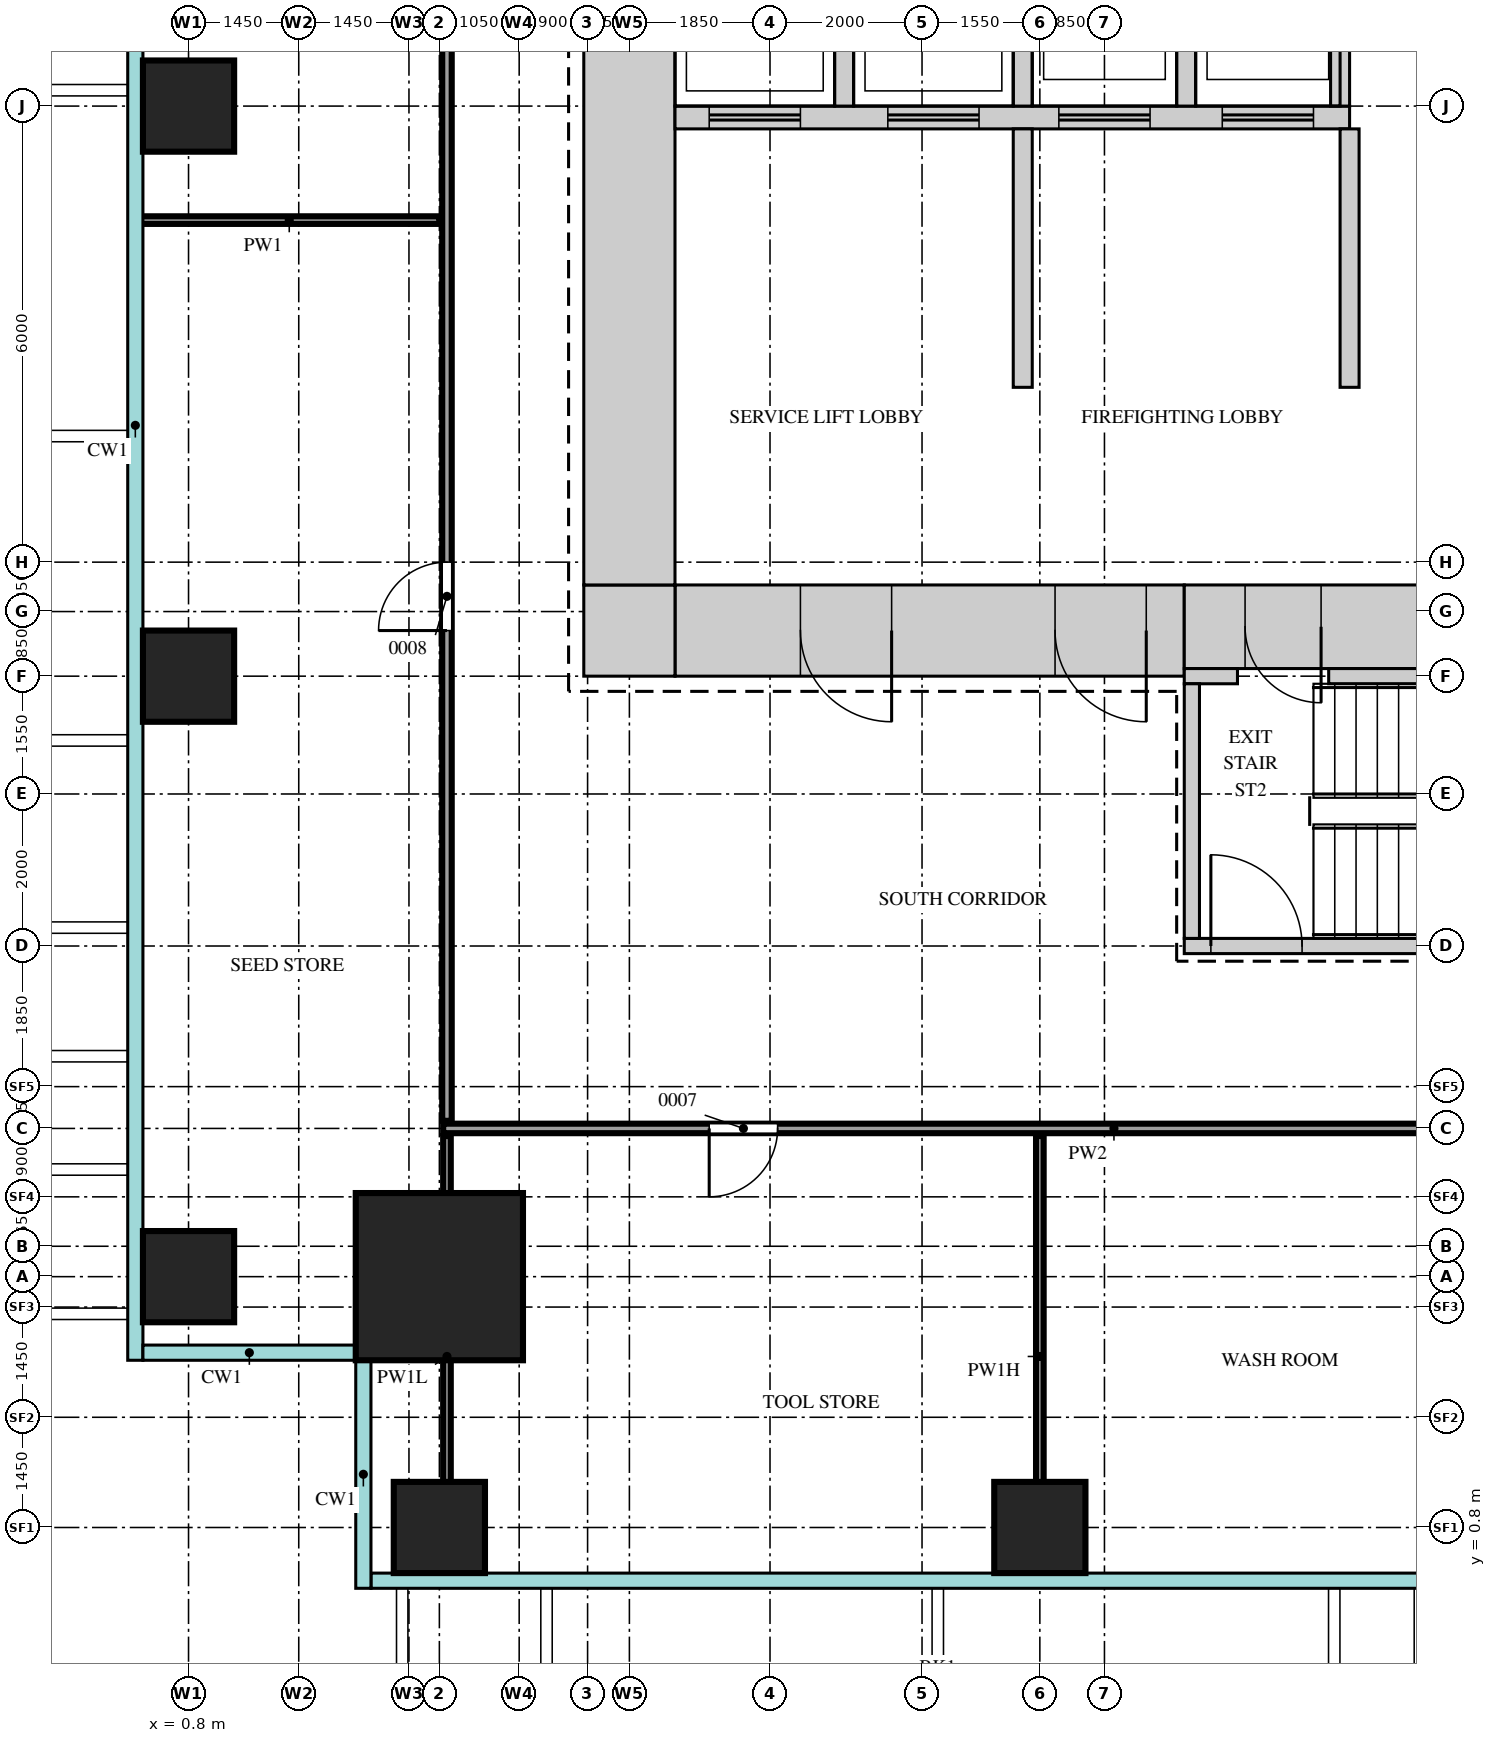
"""IFC4 building model, lengths in metres.
Left out: names, types, materials, properties, quantities, classifications, styles, units other than length and angle.
Written with IfcOpenShell. Run it as: python <this file> out.ifc"""

import sys

from ifc_helpers import new_model, si_unit, direction, frame, frame_2d, origin, origin_2d, place, context, subcontext, project, spatial, rectangle, extrude, source, transform, mapped, element, fill, save


model = new_model("IFC4")
c1 = context("Model", 3, precision=1e-05, world=origin(), true_north=direction((0.0, 1.0)))
c2 = subcontext(c1, "Body", "Model", "MODEL_VIEW")
j1 = project(units=[si_unit("LENGTHUNIT", "METRE"), si_unit("PLANEANGLEUNIT", "RADIAN")], contexts=[c1])
p1 = place(None, origin())
s1 = spatial("IfcSite", under=j1, at=p1, CompositionType="ELEMENT")
p2 = place(p1, origin())
s2 = spatial("IfcBuilding", under=s1, at=p2, CompositionType="ELEMENT")
p3 = place(p2, frame((0.0, 0.0, 60.0)))
s3 = spatial("IfcBuildingStorey", under=s2, at=p3, CompositionType="ELEMENT", Elevation=60.0)
m1 = source(origin(), c2, "Body", "SweptSolid", [
    extrude(rectangle(XDim=6.7, YDim=1.2, at=frame_2d((3.35, 0.0))), origin(), (0.0, 0.0, 1.0), 4.2),
])
p4 = place(p3, frame((7.2, 12.6, 0.0), z_axis=(0.0, 0.0, 1.0), x_axis=(1.0, 0.0, 0.0)))
e1 = element("IfcWall", 1, at=p4, inside=s3, PredefinedType="SHEAR", context=c2, shape_type="MappedRepresentation", body=[
    mapped(m1, transform((0.0, 0.0, 0.0))),
])
m2 = source(origin(), c2, "Body", "SweptSolid", [
    extrude(rectangle(XDim=1.2, YDim=2.1, at=frame_2d((0.6, 1.05))), frame((0.0, 0.61, 0.0), z_axis=(0.0, -1.0, 0.0), x_axis=(1.0, 0.0, 0.0)), (0.0, 0.0, 1.0), 1.22),
])
p5 = place(p4, frame((5.0, 0.0, 0.0)))
e2 = element("IfcOpeningElement", 2, at=p5, cuts=e1, PredefinedType="OPENING", context=c2, shape_type="MappedRepresentation", body=[
    mapped(m2, transform((0.0, 0.0, 0.0))),
])
p6 = place(p4, frame((1.65, 0.0, 0.0)))
e3 = element("IfcOpeningElement", 3, at=p6, cuts=e1, PredefinedType="OPENING", context=c2, shape_type="MappedRepresentation", body=[
    mapped(m2, transform((0.0, 0.0, 0.0))),
])
m3 = source(origin(), c2, "Body", "SweptSolid", [
    extrude(rectangle(XDim=7.2, YDim=1.1, at=frame_2d((3.6, 0.0))), origin(), (0.0, 0.0, 1.0), 4.2),
])
p7 = place(p3, frame((13.9, 12.65, 0.0), z_axis=(0.0, 0.0, 1.0), x_axis=(1.0, 0.0, 0.0)))
e4 = element("IfcWall", 4, at=p7, inside=s3, PredefinedType="SHEAR", context=c2, shape_type="MappedRepresentation", body=[
    mapped(m3, transform((0.0, 0.0, 0.0))),
])
m4 = source(origin(), c2, "Body", "SweptSolid", [
    extrude(rectangle(XDim=1.0, YDim=2.1, at=frame_2d((0.5, 1.05))), frame((0.0, 0.56, 0.0), z_axis=(0.0, -1.0, 0.0), x_axis=(1.0, 0.0, 0.0)), (0.0, 0.0, 1.0), 1.12),
])
p8 = place(p7, frame((0.8, 0.0, 0.0)))
e5 = element("IfcOpeningElement", 5, at=p8, cuts=e4, PredefinedType="OPENING", context=c2, shape_type="MappedRepresentation", body=[
    mapped(m4, transform((0.0, 0.0, 0.0))),
])
m5 = source(origin(), c2, "Body", "SweptSolid", [
    extrude(rectangle(XDim=1.2, YDim=1.2, at=frame_2d((0.6, 0.0))), origin(), (0.0, 0.0, 1.0), 4.2),
])
p9 = place(p3, frame((6.0, 12.6, 0.0), z_axis=(0.0, 0.0, 1.0), x_axis=(1.0, 0.0, 0.0)))
e6 = element("IfcWall", 6, at=p9, inside=s3, PredefinedType="SHEAR", context=c2, shape_type="MappedRepresentation", body=[
    mapped(m5, transform((0.0, 0.0, 0.0))),
])
m6 = source(origin(), c2, "Body", "SweptSolid", [
    extrude(rectangle(XDim=27.6, YDim=1.2, at=frame_2d((13.8, 0.0))), origin(), (0.0, 0.0, 1.0), 4.2),
])
p10 = place(p3, frame((6.6, 13.2, 0.0), z_axis=(0.0, 0.0, 1.0), x_axis=(0.0, 1.0, 0.0)))
e7 = element("IfcWall", 7, at=p10, inside=s3, PredefinedType="SHEAR", context=c2, shape_type="MappedRepresentation", body=[
    mapped(m6, transform((0.0, 0.0, 0.0))),
])
m7 = source(origin(), c2, "Body", "SweptSolid", [
    extrude(rectangle(XDim=0.7, YDim=0.2, at=frame_2d((0.35, 0.0))), origin(), (0.0, 0.0, 1.0), 4.2),
])
p11 = place(p3, frame((13.9, 12.0, 0.0), z_axis=(0.0, 0.0, 1.0), x_axis=(1.0, 0.0, 0.0)))
e8 = element("IfcWall", 8, at=p11, inside=s3, PredefinedType="SHEAR", context=c2, shape_type="MappedRepresentation", body=[
    mapped(m7, transform((0.0, 0.0, 0.0))),
])
m8 = source(origin(), c2, "Body", "SweptSolid", [
    extrude(rectangle(XDim=5.3, YDim=0.2, at=frame_2d((2.65, 0.0))), origin(), (0.0, 0.0, 1.0), 4.2),
])
p12 = place(p3, frame((15.8, 12.0, 0.0), z_axis=(0.0, 0.0, 1.0), x_axis=(1.0, 0.0, 0.0)))
e9 = element("IfcWall", 9, at=p12, inside=s3, PredefinedType="SHEAR", context=c2, shape_type="MappedRepresentation", body=[
    mapped(m8, transform((0.0, 0.0, 0.0))),
])
m9 = source(origin(), c2, "Body", "SweptSolid", [
    extrude(rectangle(XDim=7.2, YDim=0.2, at=frame_2d((3.6, 0.0))), origin(), (0.0, 0.0, 1.0), 4.2),
])
p13 = place(p3, frame((13.9, 8.45, 0.0), z_axis=(0.0, 0.0, 1.0), x_axis=(1.0, 0.0, 0.0)))
e10 = element("IfcWall", 10, at=p13, inside=s3, PredefinedType="SHEAR", context=c2, shape_type="MappedRepresentation", body=[
    mapped(m9, transform((0.0, 0.0, 0.0))),
])
m10 = source(origin(), c2, "Body", "SweptSolid", [
    extrude(rectangle(XDim=1.2, YDim=2.1, at=frame_2d((0.6, 1.05))), frame((0.0, 0.11, 0.0), z_axis=(0.0, -1.0, 0.0), x_axis=(1.0, 0.0, 0.0)), (0.0, 0.0, 1.0), 0.22),
])
p14 = place(p13, frame((0.35, 0.0, 0.0)))
e11 = element("IfcOpeningElement", 11, at=p14, cuts=e10, PredefinedType="OPENING", context=c2, shape_type="MappedRepresentation", body=[
    mapped(m10, transform((0.0, 0.0, 0.0))),
])
m11 = source(origin(), c2, "Body", "SweptSolid", [
    extrude(rectangle(XDim=3.35, YDim=0.2, at=frame_2d((1.675, 0.0))), origin(), (0.0, 0.0, 1.0), 4.2),
])
p15 = place(p3, frame((14.0, 8.55, 0.0), z_axis=(0.0, 0.0, 1.0), x_axis=(0.0, 1.0, 0.0)))
e12 = element("IfcWall", 12, at=p15, inside=s3, PredefinedType="SHEAR", context=c2, shape_type="MappedRepresentation", body=[
    mapped(m11, transform((0.0, 0.0, 0.0))),
])
m12 = source(origin(), c2, "Body", "SweptSolid", [
    extrude(rectangle(XDim=8.875, YDim=0.3, at=frame_2d((4.438, 0.0))), origin(), (0.0, 0.0, 1.0), 4.2),
])
p16 = place(p3, frame((7.2, 19.35, 0.0), z_axis=(0.0, 0.0, 1.0), x_axis=(1.0, 0.0, 0.0)))
e13 = element("IfcWall", 13, at=p16, inside=s3, PredefinedType="STANDARD", context=c2, shape_type="MappedRepresentation", body=[
    mapped(m12, transform((0.0, 0.0, 0.0))),
])
m13 = source(origin(), c2, "Body", "SweptSolid", [
    extrude(rectangle(XDim=1.2, YDim=2.1, at=frame_2d((0.6, 1.05))), frame((0.0, 0.16, 0.0), z_axis=(0.0, -1.0, 0.0), x_axis=(1.0, 0.0, 0.0)), (0.0, 0.0, 1.0), 0.32),
])
p17 = place(p16, frame((0.45, 0.0, 0.0)))
e14 = element("IfcOpeningElement", 14, at=p17, cuts=e13, PredefinedType="OPENING", context=c2, shape_type="MappedRepresentation", body=[
    mapped(m13, transform((0.0, 0.0, 0.0))),
])
p18 = place(p16, frame((2.8, 0.0, 0.0)))
e15 = element("IfcOpeningElement", 15, at=p18, cuts=e13, PredefinedType="OPENING", context=c2, shape_type="MappedRepresentation", body=[
    mapped(m13, transform((0.0, 0.0, 0.0))),
])
p19 = place(p16, frame((5.05, 0.0, 0.0)))
e16 = element("IfcOpeningElement", 16, at=p19, cuts=e13, PredefinedType="OPENING", context=c2, shape_type="MappedRepresentation", body=[
    mapped(m13, transform((0.0, 0.0, 0.0))),
])
p20 = place(p16, frame((7.2, 0.0, 0.0)))
e17 = element("IfcOpeningElement", 17, at=p20, cuts=e13, PredefinedType="OPENING", context=c2, shape_type="MappedRepresentation", body=[
    mapped(m13, transform((0.0, 0.0, 0.0))),
])
m14 = source(origin(), c2, "Body", "SweptSolid", [
    extrude(rectangle(XDim=3.1, YDim=0.25, at=frame_2d((1.55, 0.0))), origin(), (0.0, 0.0, 1.0), 4.2),
])
for number, where, z_axis, x_axis in (
    (18, (9.425, 19.5, 0.0), (0.0, 0.0, 1.0), (0.0, 1.0, 0.0)),
    (19, (11.775, 19.5, 0.0), (0.0, 0.0, 1.0), (0.0, 1.0, 0.0)),
    (20, (13.925, 19.5, 0.0), (0.0, 0.0, 1.0), (0.0, 1.0, 0.0)),
    (21, (15.95, 19.5, 0.0), (0.0, 0.0, 1.0), (0.0, 1.0, 0.0)),
):
    element("IfcWall", number, at=place(p3, frame(where, z_axis=z_axis, x_axis=x_axis)), inside=s3, PredefinedType="STANDARD", context=c2, shape_type="MappedRepresentation", body=[
        mapped(m14, transform((0.0, 0.0, 0.0))),
    ])
m15 = source(origin(), c2, "Body", "SweptSolid", [
    extrude(rectangle(XDim=3.4, YDim=0.25, at=frame_2d((1.7, 0.0))), origin(), (0.0, 0.0, 1.0), 4.2),
])
for number, where, z_axis, x_axis in (
    (22, (16.075, 15.8, 0.0), (0.0, 0.0, 1.0), (0.0, 1.0, 0.0)),
    (23, (11.775, 15.8, 0.0), (0.0, 0.0, 1.0), (0.0, 1.0, 0.0)),
):
    element("IfcWall", number, at=place(p3, frame(where, z_axis=z_axis, x_axis=x_axis)), inside=s3, PredefinedType="STANDARD", context=c2, shape_type="MappedRepresentation", body=[
        mapped(m15, transform((0.0, 0.0, 0.0))),
    ])
m16 = source(origin(), c2, "Body", "SweptSolid", [
    extrude(rectangle(XDim=2.2, YDim=2.2, at=origin_2d()), origin(), (0.0, 0.0, 1.0), 4.5),
])
p21 = place(p3, frame((4.1, 4.1, 0.0), z_axis=(0.0, 0.0, 1.0), x_axis=(1.0, 0.0, 0.0)))
e24 = element("IfcColumn", 24, at=p21, inside=s3, PredefinedType="COLUMN", context=c2, shape_type="MappedRepresentation", body=[
    mapped(m16, transform((0.0, 0.0, 0.0))),
])
m17 = source(origin(), c2, "Body", "SweptSolid", [
    extrude(rectangle(XDim=1.2, YDim=1.2, at=origin_2d()), origin(), (0.0, 0.0, 1.0), 4.2),
])
for number, where, z_axis, x_axis in (
    (25, (4.1, 0.8, 0.0), (0.0, 0.0, 1.0), (1.0, 0.0, 0.0)),
    (26, (12.0, 0.8, 0.0), (0.0, 0.0, 1.0), (1.0, 0.0, 0.0)),
    (27, (0.8, 4.1, 0.0), (0.0, 0.0, 1.0), (1.0, 0.0, 0.0)),
    (28, (0.8, 12.0, 0.0), (0.0, 0.0, 1.0), (1.0, 0.0, 0.0)),
    (29, (0.8, 19.5, 0.0), (0.0, 0.0, 1.0), (1.0, 0.0, 0.0)),
):
    element("IfcColumn", number, at=place(p3, frame(where, z_axis=z_axis, x_axis=x_axis)), inside=s3, PredefinedType="COLUMN", context=c2, shape_type="MappedRepresentation", body=[
        mapped(m17, transform((0.0, 0.0, 0.0))),
    ])
m18 = source(origin(), c2, "Body", "SweptSolid", [
    extrude(rectangle(XDim=5.8, YDim=0.1, at=frame_2d((2.9, 0.0))), origin(), (0.0, 0.0, 1.0), 3.6),
])
p22 = place(p3, frame((4.2, 0.15, 0.0), z_axis=(0.0, 0.0, 1.0), x_axis=(0.0, 1.0, 0.0)))
e30 = element("IfcWall", 30, at=p22, inside=s3, PredefinedType="PARTITIONING", context=c2, shape_type="MappedRepresentation", body=[
    mapped(m18, transform((0.0, 0.0, 0.0))),
])
m19 = source(origin(), c2, "Body", "SweptSolid", [
    extrude(rectangle(XDim=5.8, YDim=0.1, at=frame_2d((2.9, 0.0))), origin(), (0.0, 0.0, 1.0), 3.7),
])
p23 = place(p3, frame((12.0, 0.15, 0.0), z_axis=(0.0, 0.0, 1.0), x_axis=(0.0, 1.0, 0.0)))
e31 = element("IfcWall", 31, at=p23, inside=s3, PredefinedType="PARTITIONING", context=c2, shape_type="MappedRepresentation", body=[
    mapped(m19, transform((0.0, 0.0, 0.0))),
])
m20 = source(origin(), c2, "Body", "SweptSolid", [
    extrude(rectangle(XDim=22.3, YDim=0.125, at=frame_2d((11.15, 0.0))), origin(), (0.0, 0.0, 1.0), 4.3),
])
p24 = place(p3, frame((4.15, 6.05, 0.0), z_axis=(0.0, 0.0, 1.0), x_axis=(1.0, 0.0, 0.0)))
e32 = element("IfcWall", 32, at=p24, inside=s3, PredefinedType="PARTITIONING", context=c2, shape_type="MappedRepresentation", body=[
    mapped(m20, transform((0.0, 0.0, 0.0))),
])
m21 = source(origin(), c2, "Body", "SweptSolid", [
    extrude(rectangle(XDim=0.9, YDim=2.1, at=frame_2d((0.45, 1.05))), frame((0.0, 0.073, 0.0), z_axis=(0.0, -1.0, 0.0), x_axis=(1.0, 0.0, 0.0)), (0.0, 0.0, 1.0), 0.145),
])
p25 = place(p24, frame((3.5, 0.0, 0.0)))
e33 = element("IfcOpeningElement", 33, at=p25, cuts=e32, PredefinedType="OPENING", context=c2, shape_type="MappedRepresentation", body=[
    mapped(m21, transform((0.0, 0.0, 0.0))),
])
m22 = source(origin(), c2, "Body", "SweptSolid", [
    extrude(rectangle(XDim=1.2, YDim=2.1, at=frame_2d((0.6, 1.05))), frame((0.0, 0.073, 0.0), z_axis=(0.0, -1.0, 0.0), x_axis=(1.0, 0.0, 0.0)), (0.0, 0.0, 1.0), 0.145),
])
p26 = place(p24, frame((13.25, 0.0, 0.0)))
e34 = element("IfcOpeningElement", 34, at=p26, cuts=e32, PredefinedType="OPENING", context=c2, shape_type="MappedRepresentation", body=[
    mapped(m22, transform((0.0, 0.0, 0.0))),
])
m23 = source(origin(), c2, "Body", "SweptSolid", [
    extrude(rectangle(XDim=41.8, YDim=0.125, at=frame_2d((20.9, 0.0))), origin(), (0.0, 0.0, 1.0), 4.3),
])
p27 = place(p3, frame((4.2, 6.15, 0.0), z_axis=(0.0, 0.0, 1.0), x_axis=(0.0, 1.0, 0.0)))
e35 = element("IfcWall", 35, at=p27, inside=s3, PredefinedType="PARTITIONING", context=c2, shape_type="MappedRepresentation", body=[
    mapped(m23, transform((0.0, 0.0, 0.0))),
])
p28 = place(p27, frame((6.45, 0.0, 0.0)))
e36 = element("IfcOpeningElement", 36, at=p28, cuts=e35, PredefinedType="OPENING", context=c2, shape_type="MappedRepresentation", body=[
    mapped(m21, transform((0.0, 0.0, 0.0))),
])
p29 = place(p27, frame((25.05, 0.0, 0.0)))
e37 = element("IfcOpeningElement", 37, at=p29, cuts=e35, PredefinedType="OPENING", context=c2, shape_type="MappedRepresentation", body=[
    mapped(m22, transform((0.0, 0.0, 0.0))),
])
m24 = source(origin(), c2, "Body", "SweptSolid", [
    extrude(rectangle(XDim=3.95, YDim=0.1, at=frame_2d((1.975, 0.0))), origin(), (0.0, 0.0, 1.0), 4.3),
])
p30 = place(p3, frame((0.15, 18.0, 0.0), z_axis=(0.0, 0.0, 1.0), x_axis=(1.0, 0.0, 0.0)))
e38 = element("IfcWall", 38, at=p30, inside=s3, PredefinedType="PARTITIONING", context=c2, shape_type="MappedRepresentation", body=[
    mapped(m24, transform((0.0, 0.0, 0.0))),
])
m25 = source(origin(), c2, "Body", "SweptSolid", [
    extrude(rectangle(XDim=1.2, YDim=2.1, at=frame_2d((0.6, 1.05))), frame((0.0, 0.55, 0.0), z_axis=(0.0, -1.0, 0.0), x_axis=(1.0, 0.0, 0.0)), (0.0, 0.0, 1.0), 1.1),
])
p31 = place(p5, origin())
e39 = element("IfcDoor", 39, at=p31, inside=s3, OperationType="SINGLE_SWING_RIGHT", PredefinedType="DOOR", context=c2, shape_type="MappedRepresentation", body=[
    mapped(m25, transform((0.0, 0.0, 0.0))),
])
fill(e2, e39)
p32 = place(p6, origin())
e40 = element("IfcDoor", 40, at=p32, inside=s3, OperationType="SINGLE_SWING_RIGHT", PredefinedType="DOOR", context=c2, shape_type="MappedRepresentation", body=[
    mapped(m25, transform((0.0, 0.0, 0.0))),
])
fill(e3, e40)
m26 = source(origin(), c2, "Body", "SweptSolid", [
    extrude(rectangle(XDim=1.0, YDim=2.1, at=frame_2d((0.5, 1.05))), frame((0.0, 0.5, 0.0), z_axis=(0.0, -1.0, 0.0), x_axis=(1.0, 0.0, 0.0)), (0.0, 0.0, 1.0), 1.0),
])
p33 = place(p8, origin())
e41 = element("IfcDoor", 41, at=p33, inside=s3, OperationType="SINGLE_SWING_RIGHT", PredefinedType="DOOR", context=c2, shape_type="MappedRepresentation", body=[
    mapped(m26, transform((0.0, 0.0, 0.0))),
])
fill(e5, e41)
m27 = source(origin(), c2, "Body", "SweptSolid", [
    extrude(rectangle(XDim=0.9, YDim=2.1, at=frame_2d((0.45, 1.05))), frame((0.0, 0.025, 0.0), z_axis=(0.0, -1.0, 0.0), x_axis=(1.0, 0.0, 0.0)), (0.0, 0.0, 1.0), 0.05),
])
p34 = place(p28, origin())
e42 = element("IfcDoor", 42, at=p34, inside=s3, OperationType="SINGLE_SWING_RIGHT", PredefinedType="DOOR", context=c2, shape_type="MappedRepresentation", body=[
    mapped(m27, transform((0.0, 0.0, 0.0))),
])
fill(e36, e42)
p35 = place(p25, origin())
e43 = element("IfcDoor", 43, at=p35, inside=s3, OperationType="SINGLE_SWING_LEFT", PredefinedType="DOOR", context=c2, shape_type="MappedRepresentation", body=[
    mapped(m27, transform((0.0, 0.0, 0.0))),
])
fill(e33, e43)
m28 = source(origin(), c2, "Body", "SweptSolid", [
    extrude(rectangle(XDim=1.2, YDim=2.1, at=frame_2d((0.6, 1.05))), frame((0.0, 0.025, 0.0), z_axis=(0.0, -1.0, 0.0), x_axis=(1.0, 0.0, 0.0)), (0.0, 0.0, 1.0), 0.05),
])
p36 = place(p14, origin())
e44 = element("IfcDoor", 44, at=p36, inside=s3, OperationType="SINGLE_SWING_RIGHT", PredefinedType="DOOR", context=c2, shape_type="MappedRepresentation", body=[
    mapped(m28, transform((0.0, 0.0, 0.0))),
])
fill(e11, e44)
p37 = place(p17, origin())
e45 = element("IfcDoor", 45, at=p37, inside=s3, OperationType="DOUBLE_DOOR_SLIDING", PredefinedType="DOOR", context=c2, shape_type="MappedRepresentation", body=[
    mapped(m28, transform((0.0, 0.0, 0.0))),
])
fill(e14, e45)
p38 = place(p18, origin())
e46 = element("IfcDoor", 46, at=p38, inside=s3, OperationType="DOUBLE_DOOR_SLIDING", PredefinedType="DOOR", context=c2, shape_type="MappedRepresentation", body=[
    mapped(m28, transform((0.0, 0.0, 0.0))),
])
fill(e15, e46)
p39 = place(p19, origin())
e47 = element("IfcDoor", 47, at=p39, inside=s3, OperationType="DOUBLE_DOOR_SLIDING", PredefinedType="DOOR", context=c2, shape_type="MappedRepresentation", body=[
    mapped(m28, transform((0.0, 0.0, 0.0))),
])
fill(e16, e47)
p40 = place(p20, origin())
e48 = element("IfcDoor", 48, at=p40, inside=s3, OperationType="DOUBLE_DOOR_SLIDING", PredefinedType="DOOR", context=c2, shape_type="MappedRepresentation", body=[
    mapped(m28, transform((0.0, 0.0, 0.0))),
])
fill(e17, e48)
save(model, sys.argv[1])
